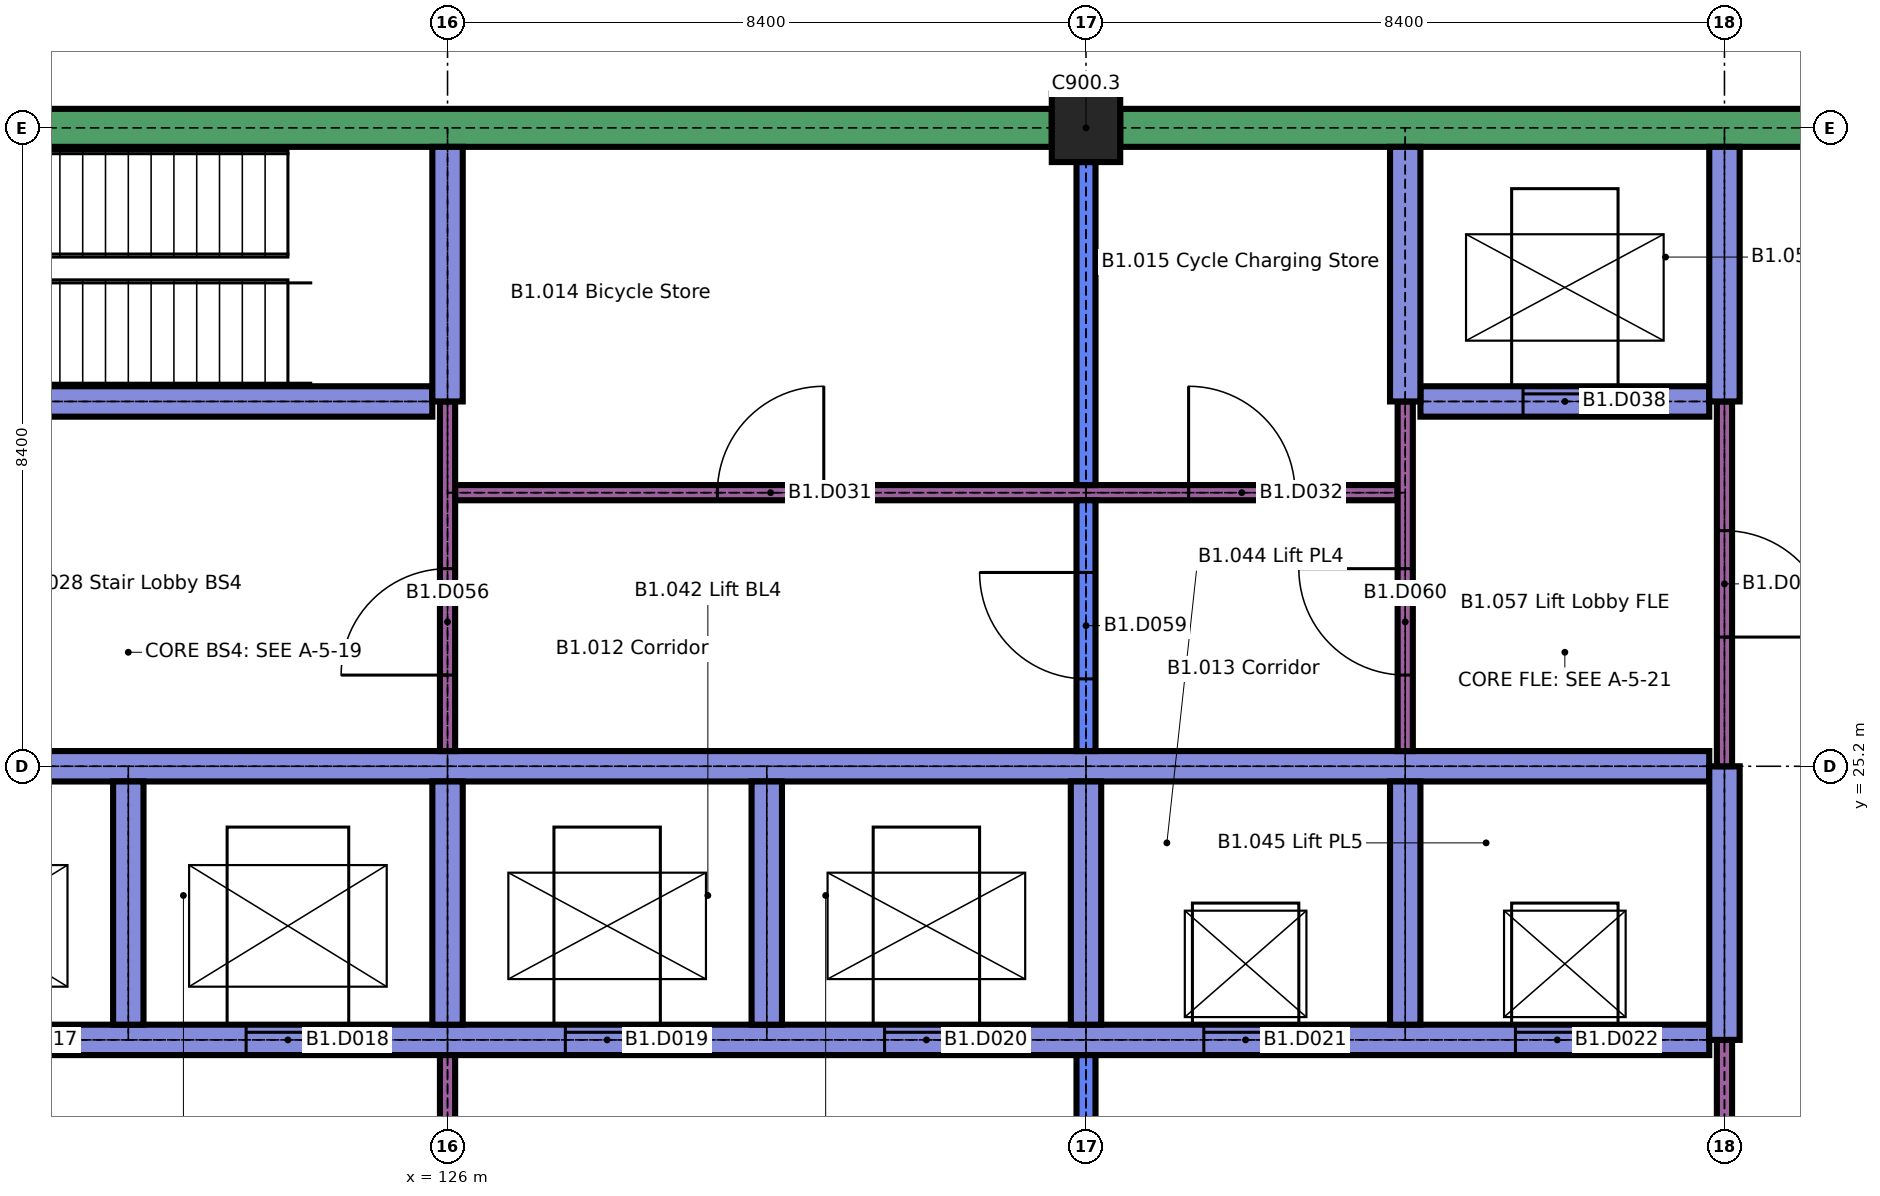
"""IFC4 building model, lengths in metres.
Left out: names, types, materials, properties, quantities, classifications, styles, units other than length and angle.
Written with IfcOpenShell. Run it as: python <this file> out.ifc"""

import sys

from ifc_helpers import new_model, si_unit, direction, frame, frame_2d, origin, origin_2d, place, context, subcontext, project, spatial, rectangle, extrude, element, fill, save


model = new_model("IFC4")
c1 = context("Model", 3, precision=1e-05, world=origin(), true_north=direction((0.0, 1.0)))
c2 = subcontext(c1, "Body", "Model", "MODEL_VIEW")
j1 = project(units=[si_unit("LENGTHUNIT", "METRE"), si_unit("PLANEANGLEUNIT", "RADIAN")], contexts=[c1])
p1 = place(None, origin())
s1 = spatial("IfcSite", under=j1, at=p1, CompositionType="ELEMENT")
p2 = place(p1, origin())
s2 = spatial("IfcBuilding", under=s1, at=p2, CompositionType="ELEMENT")
p3 = place(p2, frame((0.0, 0.0, -4.2)))
s3 = spatial("IfcBuildingStorey", under=s2, at=p3, CompositionType="ELEMENT", Elevation=-4.2)
p4 = place(p3, frame((134.4, 33.6, 0.0), z_axis=(0.0, 0.0, 1.0), x_axis=(1.0, 0.0, 0.0)))
e1 = element("IfcColumn", 1, at=p4, inside=s3, PredefinedType="COLUMN", context=c2, shape_type="SweptSolid", body=[
    extrude(rectangle(XDim=0.9, YDim=0.9, at=origin_2d()), origin(), (0.0, 0.0, 1.0), 3.75),
])
p5 = place(p3, frame((101.25, 33.6, 0.0), z_axis=(0.0, 0.0, 1.0), x_axis=(1.0, 0.0, 0.0)))
e2 = element("IfcWall", 2, at=p5, inside=s3, PredefinedType="SOLIDWALL", context=c2, shape_type="SweptSolid", body=[
    extrude(rectangle(XDim=32.7, YDim=0.5, at=frame_2d((16.35, 0.0))), origin(), (0.0, 0.0, 1.0), 3.75),
])
p6 = place(p3, frame((134.85, 33.6, 0.0), z_axis=(0.0, 0.0, 1.0), x_axis=(1.0, 0.0, 0.0)))
e3 = element("IfcWall", 3, at=p6, inside=s3, PredefinedType="SOLIDWALL", context=c2, shape_type="SweptSolid", body=[
    extrude(rectangle(XDim=15.9, YDim=0.5, at=frame_2d((7.95, 0.0))), origin(), (0.0, 0.0, 1.0), 3.75),
])
p7 = place(p3, frame((117.8, 21.6, 0.0), z_axis=(0.0, 0.0, 1.0), x_axis=(1.0, 0.0, 0.0)))
e4 = element("IfcWall", 4, at=p7, inside=s3, PredefinedType="SHEAR", context=c2, shape_type="SweptSolid", body=[
    extrude(rectangle(XDim=24.8, YDim=0.4, at=frame_2d((12.4, 0.0))), origin(), (0.0, 0.0, 1.0), 3.75),
])
p8 = place(p7, frame((1.45, 0.0, 0.0)))
e5 = element("IfcOpeningElement", 5, at=p8, cuts=e4, PredefinedType="OPENING", context=c2, shape_type="SweptSolid", body=[
    extrude(rectangle(XDim=1.1, YDim=2.1, at=frame_2d((0.55, 1.05))), frame((0.0, 0.21, 0.0), z_axis=(0.0, -1.0, 0.0), x_axis=(1.0, 0.0, 0.0)), (0.0, 0.0, 1.0), 0.42),
])
p9 = place(p7, frame((5.55, 0.0, 0.0)))
e6 = element("IfcOpeningElement", 6, at=p9, cuts=e4, PredefinedType="OPENING", context=c2, shape_type="SweptSolid", body=[
    extrude(rectangle(XDim=1.1, YDim=2.1, at=frame_2d((0.55, 1.05))), frame((0.0, 0.21, 0.0), z_axis=(0.0, -1.0, 0.0), x_axis=(1.0, 0.0, 0.0)), (0.0, 0.0, 1.0), 0.42),
])
p10 = place(p7, frame((9.75, 0.0, 0.0)))
e7 = element("IfcOpeningElement", 7, at=p10, cuts=e4, PredefinedType="OPENING", context=c2, shape_type="SweptSolid", body=[
    extrude(rectangle(XDim=1.1, YDim=2.1, at=frame_2d((0.55, 1.05))), frame((0.0, 0.21, 0.0), z_axis=(0.0, -1.0, 0.0), x_axis=(1.0, 0.0, 0.0)), (0.0, 0.0, 1.0), 0.42),
])
p11 = place(p7, frame((13.95, 0.0, 0.0)))
e8 = element("IfcOpeningElement", 8, at=p11, cuts=e4, PredefinedType="OPENING", context=c2, shape_type="SweptSolid", body=[
    extrude(rectangle(XDim=1.1, YDim=2.1, at=frame_2d((0.55, 1.05))), frame((0.0, 0.21, 0.0), z_axis=(0.0, -1.0, 0.0), x_axis=(1.0, 0.0, 0.0)), (0.0, 0.0, 1.0), 0.42),
])
p12 = place(p7, frame((18.15, 0.0, 0.0)))
e9 = element("IfcOpeningElement", 9, at=p12, cuts=e4, PredefinedType="OPENING", context=c2, shape_type="SweptSolid", body=[
    extrude(rectangle(XDim=1.1, YDim=2.1, at=frame_2d((0.55, 1.05))), frame((0.0, 0.21, 0.0), z_axis=(0.0, -1.0, 0.0), x_axis=(1.0, 0.0, 0.0)), (0.0, 0.0, 1.0), 0.42),
])
p13 = place(p7, frame((22.25, 0.0, 0.0)))
e10 = element("IfcOpeningElement", 10, at=p13, cuts=e4, PredefinedType="OPENING", context=c2, shape_type="SweptSolid", body=[
    extrude(rectangle(XDim=1.1, YDim=2.1, at=frame_2d((0.55, 1.05))), frame((0.0, 0.21, 0.0), z_axis=(0.0, -1.0, 0.0), x_axis=(1.0, 0.0, 0.0)), (0.0, 0.0, 1.0), 0.42),
])
p14 = place(p3, frame((117.8, 25.2, 0.0), z_axis=(0.0, 0.0, 1.0), x_axis=(1.0, 0.0, 0.0)))
e11 = element("IfcWall", 11, at=p14, inside=s3, PredefinedType="SHEAR", context=c2, shape_type="SweptSolid", body=[
    extrude(rectangle(XDim=24.8, YDim=0.4, at=frame_2d((12.4, 0.0))), origin(), (0.0, 0.0, 1.0), 3.75),
])
p15 = place(p3, frame((126.1, 28.8, 0.0), z_axis=(0.0, 0.0, 1.0), x_axis=(1.0, 0.0, 0.0)))
e12 = element("IfcWall", 12, at=p15, inside=s3, PredefinedType="PARTITIONING", context=c2, shape_type="SweptSolid", body=[
    extrude(rectangle(XDim=12.4, YDim=0.2, at=frame_2d((6.2, 0.0))), origin(), (0.0, 0.0, 1.0), 3.75),
])
p16 = place(p15, frame((3.45, 0.0, 0.0)))
e13 = element("IfcOpeningElement", 13, at=p16, cuts=e12, PredefinedType="OPENING", context=c2, shape_type="SweptSolid", body=[
    extrude(rectangle(XDim=1.4, YDim=2.1, at=frame_2d((0.7, 1.05))), frame((0.0, 0.11, 0.0), z_axis=(0.0, -1.0, 0.0), x_axis=(1.0, 0.0, 0.0)), (0.0, 0.0, 1.0), 0.22),
])
p17 = place(p15, frame((9.65, 0.0, 0.0)))
e14 = element("IfcOpeningElement", 14, at=p17, cuts=e12, PredefinedType="OPENING", context=c2, shape_type="SweptSolid", body=[
    extrude(rectangle(XDim=1.4, YDim=2.1, at=frame_2d((0.7, 1.05))), frame((0.0, 0.11, 0.0), z_axis=(0.0, -1.0, 0.0), x_axis=(1.0, 0.0, 0.0)), (0.0, 0.0, 1.0), 0.22),
])
p18 = place(p3, frame((117.8, 30.0, 0.0), z_axis=(0.0, 0.0, 1.0), x_axis=(1.0, 0.0, 0.0)))
e15 = element("IfcWall", 15, at=p18, inside=s3, PredefinedType="SHEAR", context=c2, shape_type="SweptSolid", body=[
    extrude(rectangle(XDim=8.0, YDim=0.4, at=frame_2d((4.0, 0.0))), origin(), (0.0, 0.0, 1.0), 3.75),
])
p19 = place(p18, frame((0.4, 0.0, 0.0)))
e16 = element("IfcOpeningElement", 16, at=p19, cuts=e15, PredefinedType="OPENING", context=c2, shape_type="SweptSolid", body=[
    extrude(rectangle(XDim=1.2, YDim=2.1, at=frame_2d((0.6, 1.05))), frame((0.0, 0.21, 0.0), z_axis=(0.0, -1.0, 0.0), x_axis=(1.0, 0.0, 0.0)), (0.0, 0.0, 1.0), 0.42),
])
p20 = place(p3, frame((138.8, 30.0, 0.0), z_axis=(0.0, 0.0, 1.0), x_axis=(1.0, 0.0, 0.0)))
e17 = element("IfcWall", 17, at=p20, inside=s3, PredefinedType="SHEAR", context=c2, shape_type="SweptSolid", body=[
    extrude(rectangle(XDim=3.8, YDim=0.4, at=frame_2d((1.9, 0.0))), origin(), (0.0, 0.0, 1.0), 3.75),
])
p21 = place(p20, frame((1.35, 0.0, 0.0)))
e18 = element("IfcOpeningElement", 18, at=p21, cuts=e17, PredefinedType="OPENING", context=c2, shape_type="SweptSolid", body=[
    extrude(rectangle(XDim=1.1, YDim=2.1, at=frame_2d((0.55, 1.05))), frame((0.0, 0.21, 0.0), z_axis=(0.0, -1.0, 0.0), x_axis=(1.0, 0.0, 0.0)), (0.0, 0.0, 1.0), 0.42),
])
p22 = place(p3, frame((121.8, 21.8, 0.0), z_axis=(0.0, 0.0, 1.0), x_axis=(0.0, 1.0, 0.0)))
e19 = element("IfcWall", 19, at=p22, inside=s3, PredefinedType="SHEAR", context=c2, shape_type="SweptSolid", body=[
    extrude(rectangle(XDim=3.2, YDim=0.4, at=frame_2d((1.6, 0.0))), origin(), (0.0, 0.0, 1.0), 3.75),
])
p23 = place(p3, frame((126.0, 16.9, 0.0), z_axis=(0.0, 0.0, 1.0), x_axis=(0.0, 1.0, 0.0)))
e20 = element("IfcWall", 20, at=p23, inside=s3, PredefinedType="PARTITIONING", context=c2, shape_type="SweptSolid", body=[
    extrude(rectangle(XDim=4.5, YDim=0.2, at=frame_2d((2.25, 0.0))), origin(), (0.0, 0.0, 1.0), 3.75),
])
p24 = place(p3, frame((126.0, 21.8, 0.0), z_axis=(0.0, 0.0, 1.0), x_axis=(0.0, 1.0, 0.0)))
e21 = element("IfcWall", 21, at=p24, inside=s3, PredefinedType="SHEAR", context=c2, shape_type="SweptSolid", body=[
    extrude(rectangle(XDim=3.2, YDim=0.4, at=frame_2d((1.6, 0.0))), origin(), (0.0, 0.0, 1.0), 3.75),
])
p25 = place(p3, frame((126.0, 25.4, 0.0), z_axis=(0.0, 0.0, 1.0), x_axis=(0.0, 1.0, 0.0)))
e22 = element("IfcWall", 22, at=p25, inside=s3, PredefinedType="PARTITIONING", context=c2, shape_type="SweptSolid", body=[
    extrude(rectangle(XDim=4.6, YDim=0.2, at=frame_2d((2.3, 0.0))), origin(), (0.0, 0.0, 1.0), 3.75),
])
p26 = place(p25, frame((1.0, 0.0, 0.0)))
e23 = element("IfcOpeningElement", 23, at=p26, cuts=e22, PredefinedType="OPENING", context=c2, shape_type="SweptSolid", body=[
    extrude(rectangle(XDim=1.4, YDim=2.1, at=frame_2d((0.7, 1.05))), frame((0.0, 0.11, 0.0), z_axis=(0.0, -1.0, 0.0), x_axis=(1.0, 0.0, 0.0)), (0.0, 0.0, 1.0), 0.22),
])
p27 = place(p3, frame((126.0, 30.0, 0.0), z_axis=(0.0, 0.0, 1.0), x_axis=(0.0, 1.0, 0.0)))
e24 = element("IfcWall", 24, at=p27, inside=s3, PredefinedType="SHEAR", context=c2, shape_type="SweptSolid", body=[
    extrude(rectangle(XDim=3.35, YDim=0.4, at=frame_2d((1.675, 0.0))), origin(), (0.0, 0.0, 1.0), 3.75),
])
p28 = place(p3, frame((130.2, 21.8, 0.0), z_axis=(0.0, 0.0, 1.0), x_axis=(0.0, 1.0, 0.0)))
e25 = element("IfcWall", 25, at=p28, inside=s3, PredefinedType="SHEAR", context=c2, shape_type="SweptSolid", body=[
    extrude(rectangle(XDim=3.2, YDim=0.4, at=frame_2d((1.6, 0.0))), origin(), (0.0, 0.0, 1.0), 3.75),
])
p29 = place(p3, frame((134.4, 16.9, 0.0), z_axis=(0.0, 0.0, 1.0), x_axis=(0.0, 1.0, 0.0)))
e26 = element("IfcWall", 26, at=p29, inside=s3, PredefinedType="SOLIDWALL", context=c2, shape_type="SweptSolid", body=[
    extrude(rectangle(XDim=4.5, YDim=0.25, at=frame_2d((2.25, 0.0))), origin(), (0.0, 0.0, 1.0), 3.75),
])
p30 = place(p3, frame((134.4, 21.8, 0.0), z_axis=(0.0, 0.0, 1.0), x_axis=(0.0, 1.0, 0.0)))
e27 = element("IfcWall", 27, at=p30, inside=s3, PredefinedType="SHEAR", context=c2, shape_type="SweptSolid", body=[
    extrude(rectangle(XDim=3.2, YDim=0.4, at=frame_2d((1.6, 0.0))), origin(), (0.0, 0.0, 1.0), 3.75),
])
p31 = place(p3, frame((134.4, 25.4, 0.0), z_axis=(0.0, 0.0, 1.0), x_axis=(0.0, 1.0, 0.0)))
e28 = element("IfcWall", 28, at=p31, inside=s3, PredefinedType="SOLIDWALL", context=c2, shape_type="SweptSolid", body=[
    extrude(rectangle(XDim=3.3, YDim=0.25, at=frame_2d((1.65, 0.0))), origin(), (0.0, 0.0, 1.0), 3.75),
])
p32 = place(p31, frame((0.95, 0.0, 0.0)))
e29 = element("IfcOpeningElement", 29, at=p32, cuts=e28, PredefinedType="OPENING", context=c2, shape_type="SweptSolid", body=[
    extrude(rectangle(XDim=1.4, YDim=2.1, at=frame_2d((0.7, 1.05))), frame((0.0, 0.135, 0.0), z_axis=(0.0, -1.0, 0.0), x_axis=(1.0, 0.0, 0.0)), (0.0, 0.0, 1.0), 0.27),
])
p33 = place(p3, frame((134.4, 28.9, 0.0), z_axis=(0.0, 0.0, 1.0), x_axis=(0.0, 1.0, 0.0)))
e30 = element("IfcWall", 30, at=p33, inside=s3, PredefinedType="SOLIDWALL", context=c2, shape_type="SweptSolid", body=[
    extrude(rectangle(XDim=4.25, YDim=0.25, at=frame_2d((2.125, 0.0))), origin(), (0.0, 0.0, 1.0), 3.75),
])
p34 = place(p3, frame((138.6, 21.8, 0.0), z_axis=(0.0, 0.0, 1.0), x_axis=(0.0, 1.0, 0.0)))
e31 = element("IfcWall", 31, at=p34, inside=s3, PredefinedType="SHEAR", context=c2, shape_type="SweptSolid", body=[
    extrude(rectangle(XDim=3.2, YDim=0.4, at=frame_2d((1.6, 0.0))), origin(), (0.0, 0.0, 1.0), 3.75),
])
p35 = place(p3, frame((138.6, 25.4, 0.0), z_axis=(0.0, 0.0, 1.0), x_axis=(0.0, 1.0, 0.0)))
e32 = element("IfcWall", 32, at=p35, inside=s3, PredefinedType="PARTITIONING", context=c2, shape_type="SweptSolid", body=[
    extrude(rectangle(XDim=4.6, YDim=0.2, at=frame_2d((2.3, 0.0))), origin(), (0.0, 0.0, 1.0), 3.75),
])
p36 = place(p35, frame((1.0, 0.0, 0.0)))
e33 = element("IfcOpeningElement", 33, at=p36, cuts=e32, PredefinedType="OPENING", context=c2, shape_type="SweptSolid", body=[
    extrude(rectangle(XDim=1.4, YDim=2.1, at=frame_2d((0.7, 1.05))), frame((0.0, 0.11, 0.0), z_axis=(0.0, -1.0, 0.0), x_axis=(1.0, 0.0, 0.0)), (0.0, 0.0, 1.0), 0.22),
])
p37 = place(p3, frame((138.6, 30.0, 0.0), z_axis=(0.0, 0.0, 1.0), x_axis=(0.0, 1.0, 0.0)))
e34 = element("IfcWall", 34, at=p37, inside=s3, PredefinedType="SHEAR", context=c2, shape_type="SweptSolid", body=[
    extrude(rectangle(XDim=3.35, YDim=0.4, at=frame_2d((1.675, 0.0))), origin(), (0.0, 0.0, 1.0), 3.75),
])
p38 = place(p3, frame((142.8, 16.9, 0.0), z_axis=(0.0, 0.0, 1.0), x_axis=(0.0, 1.0, 0.0)))
e35 = element("IfcWall", 35, at=p38, inside=s3, PredefinedType="PARTITIONING", context=c2, shape_type="SweptSolid", body=[
    extrude(rectangle(XDim=4.7, YDim=0.2, at=frame_2d((2.35, 0.0))), origin(), (0.0, 0.0, 1.0), 3.75),
])
p39 = place(p38, frame((1.65, 0.0, 0.0)))
e36 = element("IfcOpeningElement", 36, at=p39, cuts=e35, PredefinedType="OPENING", context=c2, shape_type="SweptSolid", body=[
    extrude(rectangle(XDim=1.4, YDim=2.1, at=frame_2d((0.7, 1.05))), frame((0.0, 0.11, 0.0), z_axis=(0.0, -1.0, 0.0), x_axis=(1.0, 0.0, 0.0)), (0.0, 0.0, 1.0), 0.22),
])
p40 = place(p3, frame((142.8, 21.6, 0.0), z_axis=(0.0, 0.0, 1.0), x_axis=(0.0, 1.0, 0.0)))
e37 = element("IfcWall", 37, at=p40, inside=s3, PredefinedType="SHEAR", context=c2, shape_type="SweptSolid", body=[
    extrude(rectangle(XDim=3.6, YDim=0.4, at=frame_2d((1.8, 0.0))), origin(), (0.0, 0.0, 1.0), 3.75),
])
p41 = place(p3, frame((142.8, 25.2, 0.0), z_axis=(0.0, 0.0, 1.0), x_axis=(0.0, 1.0, 0.0)))
e38 = element("IfcWall", 38, at=p41, inside=s3, PredefinedType="PARTITIONING", context=c2, shape_type="SweptSolid", body=[
    extrude(rectangle(XDim=4.8, YDim=0.2, at=frame_2d((2.4, 0.0))), origin(), (0.0, 0.0, 1.0), 3.75),
])
p42 = place(p41, frame((1.7, 0.0, 0.0)))
e39 = element("IfcOpeningElement", 39, at=p42, cuts=e38, PredefinedType="OPENING", context=c2, shape_type="SweptSolid", body=[
    extrude(rectangle(XDim=1.4, YDim=2.1, at=frame_2d((0.7, 1.05))), frame((0.0, 0.11, 0.0), z_axis=(0.0, -1.0, 0.0), x_axis=(1.0, 0.0, 0.0)), (0.0, 0.0, 1.0), 0.22),
])
p43 = place(p3, frame((142.8, 30.0, 0.0), z_axis=(0.0, 0.0, 1.0), x_axis=(0.0, 1.0, 0.0)))
e40 = element("IfcWall", 40, at=p43, inside=s3, PredefinedType="SHEAR", context=c2, shape_type="SweptSolid", body=[
    extrude(rectangle(XDim=3.35, YDim=0.4, at=frame_2d((1.675, 0.0))), origin(), (0.0, 0.0, 1.0), 3.75),
])
p44 = place(p9, origin())
e41 = element("IfcDoor", 41, at=p44, inside=s3, OperationType="SLIDING_TO_LEFT", PredefinedType="DOOR", context=c2, shape_type="SweptSolid", body=[
    extrude(rectangle(XDim=1.1, YDim=2.1, at=frame_2d((0.55, 1.05))), frame((0.0, 0.025, 0.0), z_axis=(0.0, -1.0, 0.0), x_axis=(1.0, 0.0, 0.0)), (0.0, 0.0, 1.0), 0.05),
])
fill(e6, e41)
p45 = place(p10, origin())
e42 = element("IfcDoor", 42, at=p45, inside=s3, OperationType="SLIDING_TO_LEFT", PredefinedType="DOOR", context=c2, shape_type="SweptSolid", body=[
    extrude(rectangle(XDim=1.1, YDim=2.1, at=frame_2d((0.55, 1.05))), frame((0.0, 0.025, 0.0), z_axis=(0.0, -1.0, 0.0), x_axis=(1.0, 0.0, 0.0)), (0.0, 0.0, 1.0), 0.05),
])
fill(e7, e42)
p46 = place(p11, origin())
e43 = element("IfcDoor", 43, at=p46, inside=s3, OperationType="SLIDING_TO_LEFT", PredefinedType="DOOR", context=c2, shape_type="SweptSolid", body=[
    extrude(rectangle(XDim=1.1, YDim=2.1, at=frame_2d((0.55, 1.05))), frame((0.0, 0.025, 0.0), z_axis=(0.0, -1.0, 0.0), x_axis=(1.0, 0.0, 0.0)), (0.0, 0.0, 1.0), 0.05),
])
fill(e8, e43)
p47 = place(p12, origin())
e44 = element("IfcDoor", 44, at=p47, inside=s3, OperationType="SLIDING_TO_LEFT", PredefinedType="DOOR", context=c2, shape_type="SweptSolid", body=[
    extrude(rectangle(XDim=1.1, YDim=2.1, at=frame_2d((0.55, 1.05))), frame((0.0, 0.025, 0.0), z_axis=(0.0, -1.0, 0.0), x_axis=(1.0, 0.0, 0.0)), (0.0, 0.0, 1.0), 0.05),
])
fill(e9, e44)
p48 = place(p13, origin())
e45 = element("IfcDoor", 45, at=p48, inside=s3, OperationType="SLIDING_TO_LEFT", PredefinedType="DOOR", context=c2, shape_type="SweptSolid", body=[
    extrude(rectangle(XDim=1.1, YDim=2.1, at=frame_2d((0.55, 1.05))), frame((0.0, 0.025, 0.0), z_axis=(0.0, -1.0, 0.0), x_axis=(1.0, 0.0, 0.0)), (0.0, 0.0, 1.0), 0.05),
])
fill(e10, e45)
p49 = place(p16, origin())
e46 = element("IfcDoor", 46, at=p49, inside=s3, OperationType="SINGLE_SWING_LEFT", PredefinedType="DOOR", context=c2, shape_type="SweptSolid", body=[
    extrude(rectangle(XDim=1.4, YDim=2.1, at=frame_2d((0.7, 1.05))), frame((0.0, 0.025, 0.0), z_axis=(0.0, -1.0, 0.0), x_axis=(1.0, 0.0, 0.0)), (0.0, 0.0, 1.0), 0.05),
])
fill(e13, e46)
p50 = place(p17, origin())
e47 = element("IfcDoor", 47, at=p50, inside=s3, OperationType="SINGLE_SWING_RIGHT", PredefinedType="DOOR", context=c2, shape_type="SweptSolid", body=[
    extrude(rectangle(XDim=1.4, YDim=2.1, at=frame_2d((0.7, 1.05))), frame((0.0, 0.025, 0.0), z_axis=(0.0, -1.0, 0.0), x_axis=(1.0, 0.0, 0.0)), (0.0, 0.0, 1.0), 0.05),
])
fill(e14, e47)
p51 = place(p21, origin())
e48 = element("IfcDoor", 48, at=p51, inside=s3, OperationType="SLIDING_TO_LEFT", PredefinedType="DOOR", context=c2, shape_type="SweptSolid", body=[
    extrude(rectangle(XDim=1.1, YDim=2.1, at=frame_2d((0.55, 1.05))), frame((0.0, 0.025, 0.0), z_axis=(0.0, -1.0, 0.0), x_axis=(1.0, 0.0, 0.0)), (0.0, 0.0, 1.0), 0.05),
])
fill(e18, e48)
p52 = place(p26, origin())
e49 = element("IfcDoor", 49, at=p52, inside=s3, OperationType="SINGLE_SWING_RIGHT", PredefinedType="DOOR", context=c2, shape_type="SweptSolid", body=[
    extrude(rectangle(XDim=1.4, YDim=2.1, at=frame_2d((0.7, 1.05))), frame((0.0, 0.03, 0.0), z_axis=(0.0, -1.0, 0.0), x_axis=(1.0, 0.0, 0.0)), (0.0, 0.0, 1.0), 0.06),
])
fill(e23, e49)
p53 = place(p32, origin())
e50 = element("IfcDoor", 50, at=p53, inside=s3, OperationType="SINGLE_SWING_LEFT", PredefinedType="DOOR", context=c2, shape_type="SweptSolid", body=[
    extrude(rectangle(XDim=1.4, YDim=2.1, at=frame_2d((0.7, 1.05))), frame((0.0, 0.03, 0.0), z_axis=(0.0, -1.0, 0.0), x_axis=(1.0, 0.0, 0.0)), (0.0, 0.0, 1.0), 0.06),
])
fill(e29, e50)
p54 = place(p36, origin())
e51 = element("IfcDoor", 51, at=p54, inside=s3, OperationType="SINGLE_SWING_LEFT", PredefinedType="DOOR", context=c2, shape_type="SweptSolid", body=[
    extrude(rectangle(XDim=1.4, YDim=2.1, at=frame_2d((0.7, 1.05))), frame((0.0, 0.03, 0.0), z_axis=(0.0, -1.0, 0.0), x_axis=(1.0, 0.0, 0.0)), (0.0, 0.0, 1.0), 0.06),
])
fill(e33, e51)
p55 = place(p42, origin())
e52 = element("IfcDoor", 52, at=p55, inside=s3, OperationType="SINGLE_SWING_LEFT", PredefinedType="DOOR", context=c2, shape_type="SweptSolid", body=[
    extrude(rectangle(XDim=1.4, YDim=2.1, at=frame_2d((0.7, 1.05))), frame((0.0, 0.025, 0.0), z_axis=(0.0, -1.0, 0.0), x_axis=(1.0, 0.0, 0.0)), (0.0, 0.0, 1.0), 0.05),
])
fill(e39, e52)
save(model, sys.argv[1])
